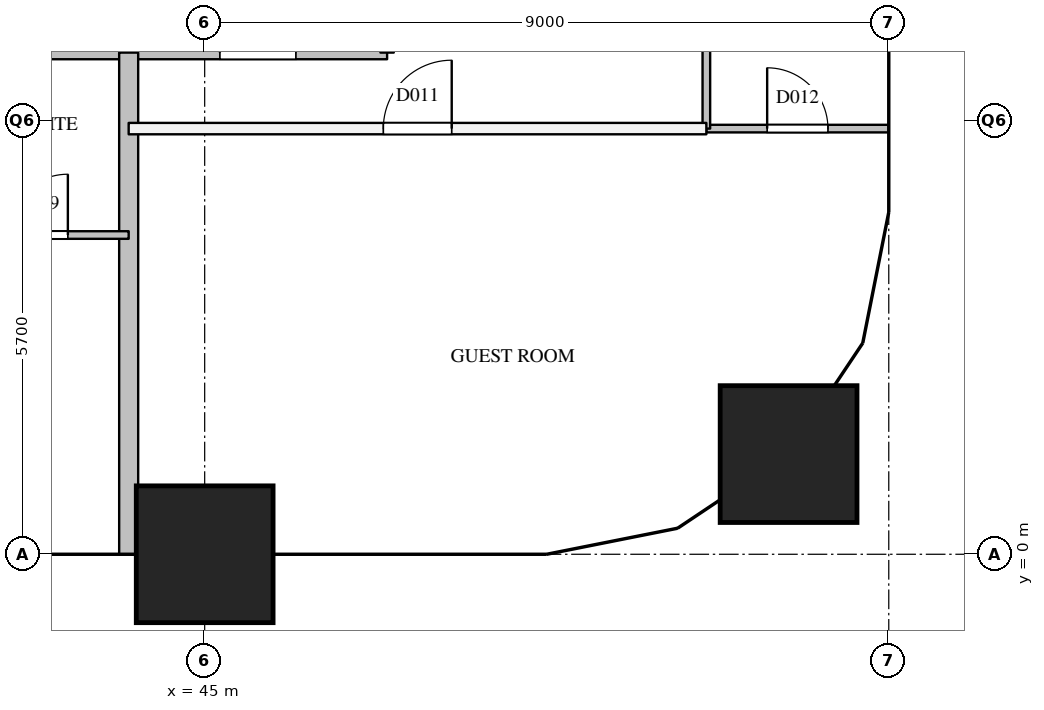
"""IFC4 building model, lengths in metres.
Left out: names, types, materials, properties, quantities, classifications, styles, units other than length and angle.
Written with IfcOpenShell. Run it as: python <this file> out.ifc"""

import sys

from ifc_helpers import new_model, si_unit, direction, frame, frame_2d, origin, origin_2d, place, context, subcontext, project, spatial, rectangle, extrude, element, fill, save


model = new_model("IFC4")
c1 = context("Model", 3, precision=1e-05, world=origin(), true_north=direction((0.0, 1.0)))
c2 = subcontext(c1, "Body", "Model", "MODEL_VIEW")
j1 = project(units=[si_unit("LENGTHUNIT", "METRE"), si_unit("PLANEANGLEUNIT", "RADIAN")], contexts=[c1])
p1 = place(None, origin())
s1 = spatial("IfcSite", under=j1, at=p1, CompositionType="ELEMENT")
p2 = place(p1, origin())
s2 = spatial("IfcBuilding", under=s1, at=p2, CompositionType="ELEMENT")
p3 = place(p2, frame((0.0, 0.0, 38.6)))
s3 = spatial("IfcBuildingStorey", under=s2, at=p3, CompositionType="ELEMENT", Elevation=38.6)
for number, where, z_axis, x_axis in (
    (1, (45.0, 0.0, 0.0), (0.0, 0.0, 1.0), (1.0, 0.0, 0.0)),
    (2, (52.682, 1.318, 0.0), (0.0, 0.0, 1.0), (1.0, 0.0, 0.0)),
):
    element("IfcColumn", number, at=place(p3, frame(where, z_axis=z_axis, x_axis=x_axis)), inside=s3, PredefinedType="COLUMN", context=c2, shape_type="SweptSolid", body=[
        extrude(rectangle(XDim=1.8, YDim=1.8, at=origin_2d()), origin(), (0.0, 0.0, 1.0), 3.8),
    ])
p4 = place(p3, frame((33.6, 6.6, 0.0), z_axis=(0.0, 0.0, 1.0), x_axis=(1.0, 0.0, 0.0)))
e3 = element("IfcWall", 3, at=p4, inside=s3, PredefinedType="PARTITIONING", context=c2, shape_type="SweptSolid", body=[
    extrude(rectangle(XDim=13.8, YDim=0.175, at=frame_2d((6.9, 0.0))), origin(), (0.0, 0.0, 1.0), 3.5),
])
p5 = place(p4, frame((4.7, 0.0, 0.0)))
e4 = element("IfcOpeningElement", 4, at=p5, cuts=e3, PredefinedType="OPENING", context=c2, shape_type="SweptSolid", body=[
    extrude(rectangle(XDim=1.0, YDim=2.1, at=frame_2d((0.5, 1.05))), frame((0.0, 0.097, 0.0), z_axis=(0.0, -1.0, 0.0), x_axis=(1.0, 0.0, 0.0)), (0.0, 0.0, 1.0), 0.195),
])
p6 = place(p4, frame((11.6, 0.0, 0.0)))
e5 = element("IfcOpeningElement", 5, at=p6, cuts=e3, PredefinedType="OPENING", context=c2, shape_type="SweptSolid", body=[
    extrude(rectangle(XDim=1.0, YDim=2.1, at=frame_2d((0.5, 1.05))), frame((0.0, 0.097, 0.0), z_axis=(0.0, -1.0, 0.0), x_axis=(1.0, 0.0, 0.0)), (0.0, 0.0, 1.0), 0.195),
])
p7 = place(p3, frame((44.0, 5.6, 0.0), z_axis=(0.0, 0.0, 1.0), x_axis=(1.0, 0.0, 0.0)))
e6 = element("IfcWall", 6, at=p7, inside=s3, PredefinedType="PARTITIONING", context=c2, shape_type="SweptSolid", body=[
    extrude(rectangle(XDim=7.6, YDim=0.15, at=frame_2d((3.8, 0.0))), origin(), (0.0, 0.0, 1.0), 3.5),
])
p8 = place(p7, frame((3.35, 0.0, 0.0)))
e7 = element("IfcOpeningElement", 7, at=p8, cuts=e6, PredefinedType="OPENING", context=c2, shape_type="SweptSolid", body=[
    extrude(rectangle(XDim=0.9, YDim=2.1, at=frame_2d((0.45, 1.05))), frame((0.0, 0.085, 0.0), z_axis=(0.0, -1.0, 0.0), x_axis=(1.0, 0.0, 0.0)), (0.0, 0.0, 1.0), 0.17),
])
p9 = place(p3, frame((44.0, 0.0, 0.0), z_axis=(0.0, 0.0, 1.0), x_axis=(0.0, 1.0, 0.0)))
e8 = element("IfcWall", 8, at=p9, inside=s3, PredefinedType="PARTITIONING", context=c2, shape_type="SweptSolid", body=[
    extrude(rectangle(XDim=6.6, YDim=0.25, at=frame_2d((3.3, 0.0))), origin(), (0.0, 0.0, 1.0), 2.5),
])
p10 = place(p3, frame((41.6, 4.2, 0.0), z_axis=(0.0, 0.0, 1.0), x_axis=(1.0, 0.0, 0.0)))
e9 = element("IfcWall", 9, at=p10, inside=s3, PredefinedType="PARTITIONING", context=c2, shape_type="SweptSolid", body=[
    extrude(rectangle(XDim=2.4, YDim=0.1, at=frame_2d((1.2, 0.0))), origin(), (0.0, 0.0, 1.0), 3.5),
])
p11 = place(p10, frame((0.8, 0.0, 0.0)))
e10 = element("IfcOpeningElement", 10, at=p11, cuts=e9, PredefinedType="OPENING", context=c2, shape_type="SweptSolid", body=[
    extrude(rectangle(XDim=0.8, YDim=2.1, at=frame_2d((0.4, 1.05))), frame((0.0, 0.06, 0.0), z_axis=(0.0, -1.0, 0.0), x_axis=(1.0, 0.0, 0.0)), (0.0, 0.0, 1.0), 0.12),
])
p12 = place(p3, frame((51.6, 5.6, 0.0), z_axis=(0.0, 0.0, 1.0), x_axis=(1.0, 0.0, 0.0)))
e11 = element("IfcWall", 11, at=p12, inside=s3, PredefinedType="PARTITIONING", context=c2, shape_type="SweptSolid", body=[
    extrude(rectangle(XDim=2.4, YDim=0.1, at=frame_2d((1.2, 0.0))), origin(), (0.0, 0.0, 1.0), 2.5),
])
p13 = place(p12, frame((0.8, 0.0, 0.0)))
e12 = element("IfcOpeningElement", 12, at=p13, cuts=e11, PredefinedType="OPENING", context=c2, shape_type="SweptSolid", body=[
    extrude(rectangle(XDim=0.8, YDim=2.1, at=frame_2d((0.4, 1.05))), frame((0.0, 0.06, 0.0), z_axis=(0.0, -1.0, 0.0), x_axis=(1.0, 0.0, 0.0)), (0.0, 0.0, 1.0), 0.12),
])
p14 = place(p3, frame((51.6, 5.6, 0.0), z_axis=(0.0, 0.0, 1.0), x_axis=(0.0, 1.0, 0.0)))
e13 = element("IfcWall", 13, at=p14, inside=s3, PredefinedType="PARTITIONING", context=c2, shape_type="SweptSolid", body=[
    extrude(rectangle(XDim=2.4, YDim=0.1, at=frame_2d((1.2, 0.0))), origin(), (0.0, 0.0, 1.0), 3.5),
])
p15 = place(p11, origin())
e14 = element("IfcDoor", 14, at=p15, inside=s3, OperationType="SINGLE_SWING_RIGHT", PredefinedType="DOOR", context=c2, shape_type="SweptSolid", body=[
    extrude(rectangle(XDim=0.8, YDim=2.1, at=frame_2d((0.4, 1.05))), frame((0.0, 0.025, 0.0), z_axis=(0.0, -1.0, 0.0), x_axis=(1.0, 0.0, 0.0)), (0.0, 0.0, 1.0), 0.05),
])
fill(e10, e14)
p16 = place(p6, origin())
e15 = element("IfcDoor", 15, at=p16, inside=s3, OperationType="SINGLE_SWING_LEFT", PredefinedType="DOOR", context=c2, shape_type="SweptSolid", body=[
    extrude(rectangle(XDim=1.0, YDim=2.1, at=frame_2d((0.5, 1.05))), frame((0.0, 0.025, 0.0), z_axis=(0.0, -1.0, 0.0), x_axis=(1.0, 0.0, 0.0)), (0.0, 0.0, 1.0), 0.05),
])
fill(e5, e15)
p17 = place(p8, origin())
e16 = element("IfcDoor", 16, at=p17, inside=s3, OperationType="SINGLE_SWING_RIGHT", PredefinedType="DOOR", context=c2, shape_type="SweptSolid", body=[
    extrude(rectangle(XDim=0.9, YDim=2.1, at=frame_2d((0.45, 1.05))), frame((0.0, 0.025, 0.0), z_axis=(0.0, -1.0, 0.0), x_axis=(1.0, 0.0, 0.0)), (0.0, 0.0, 1.0), 0.05),
])
fill(e7, e16)
p18 = place(p13, origin())
e17 = element("IfcDoor", 17, at=p18, inside=s3, OperationType="SINGLE_SWING_LEFT", PredefinedType="DOOR", context=c2, shape_type="SweptSolid", body=[
    extrude(rectangle(XDim=0.8, YDim=2.1, at=frame_2d((0.4, 1.05))), frame((0.0, 0.025, 0.0), z_axis=(0.0, -1.0, 0.0), x_axis=(1.0, 0.0, 0.0)), (0.0, 0.0, 1.0), 0.05),
])
fill(e12, e17)
save(model, sys.argv[1])
